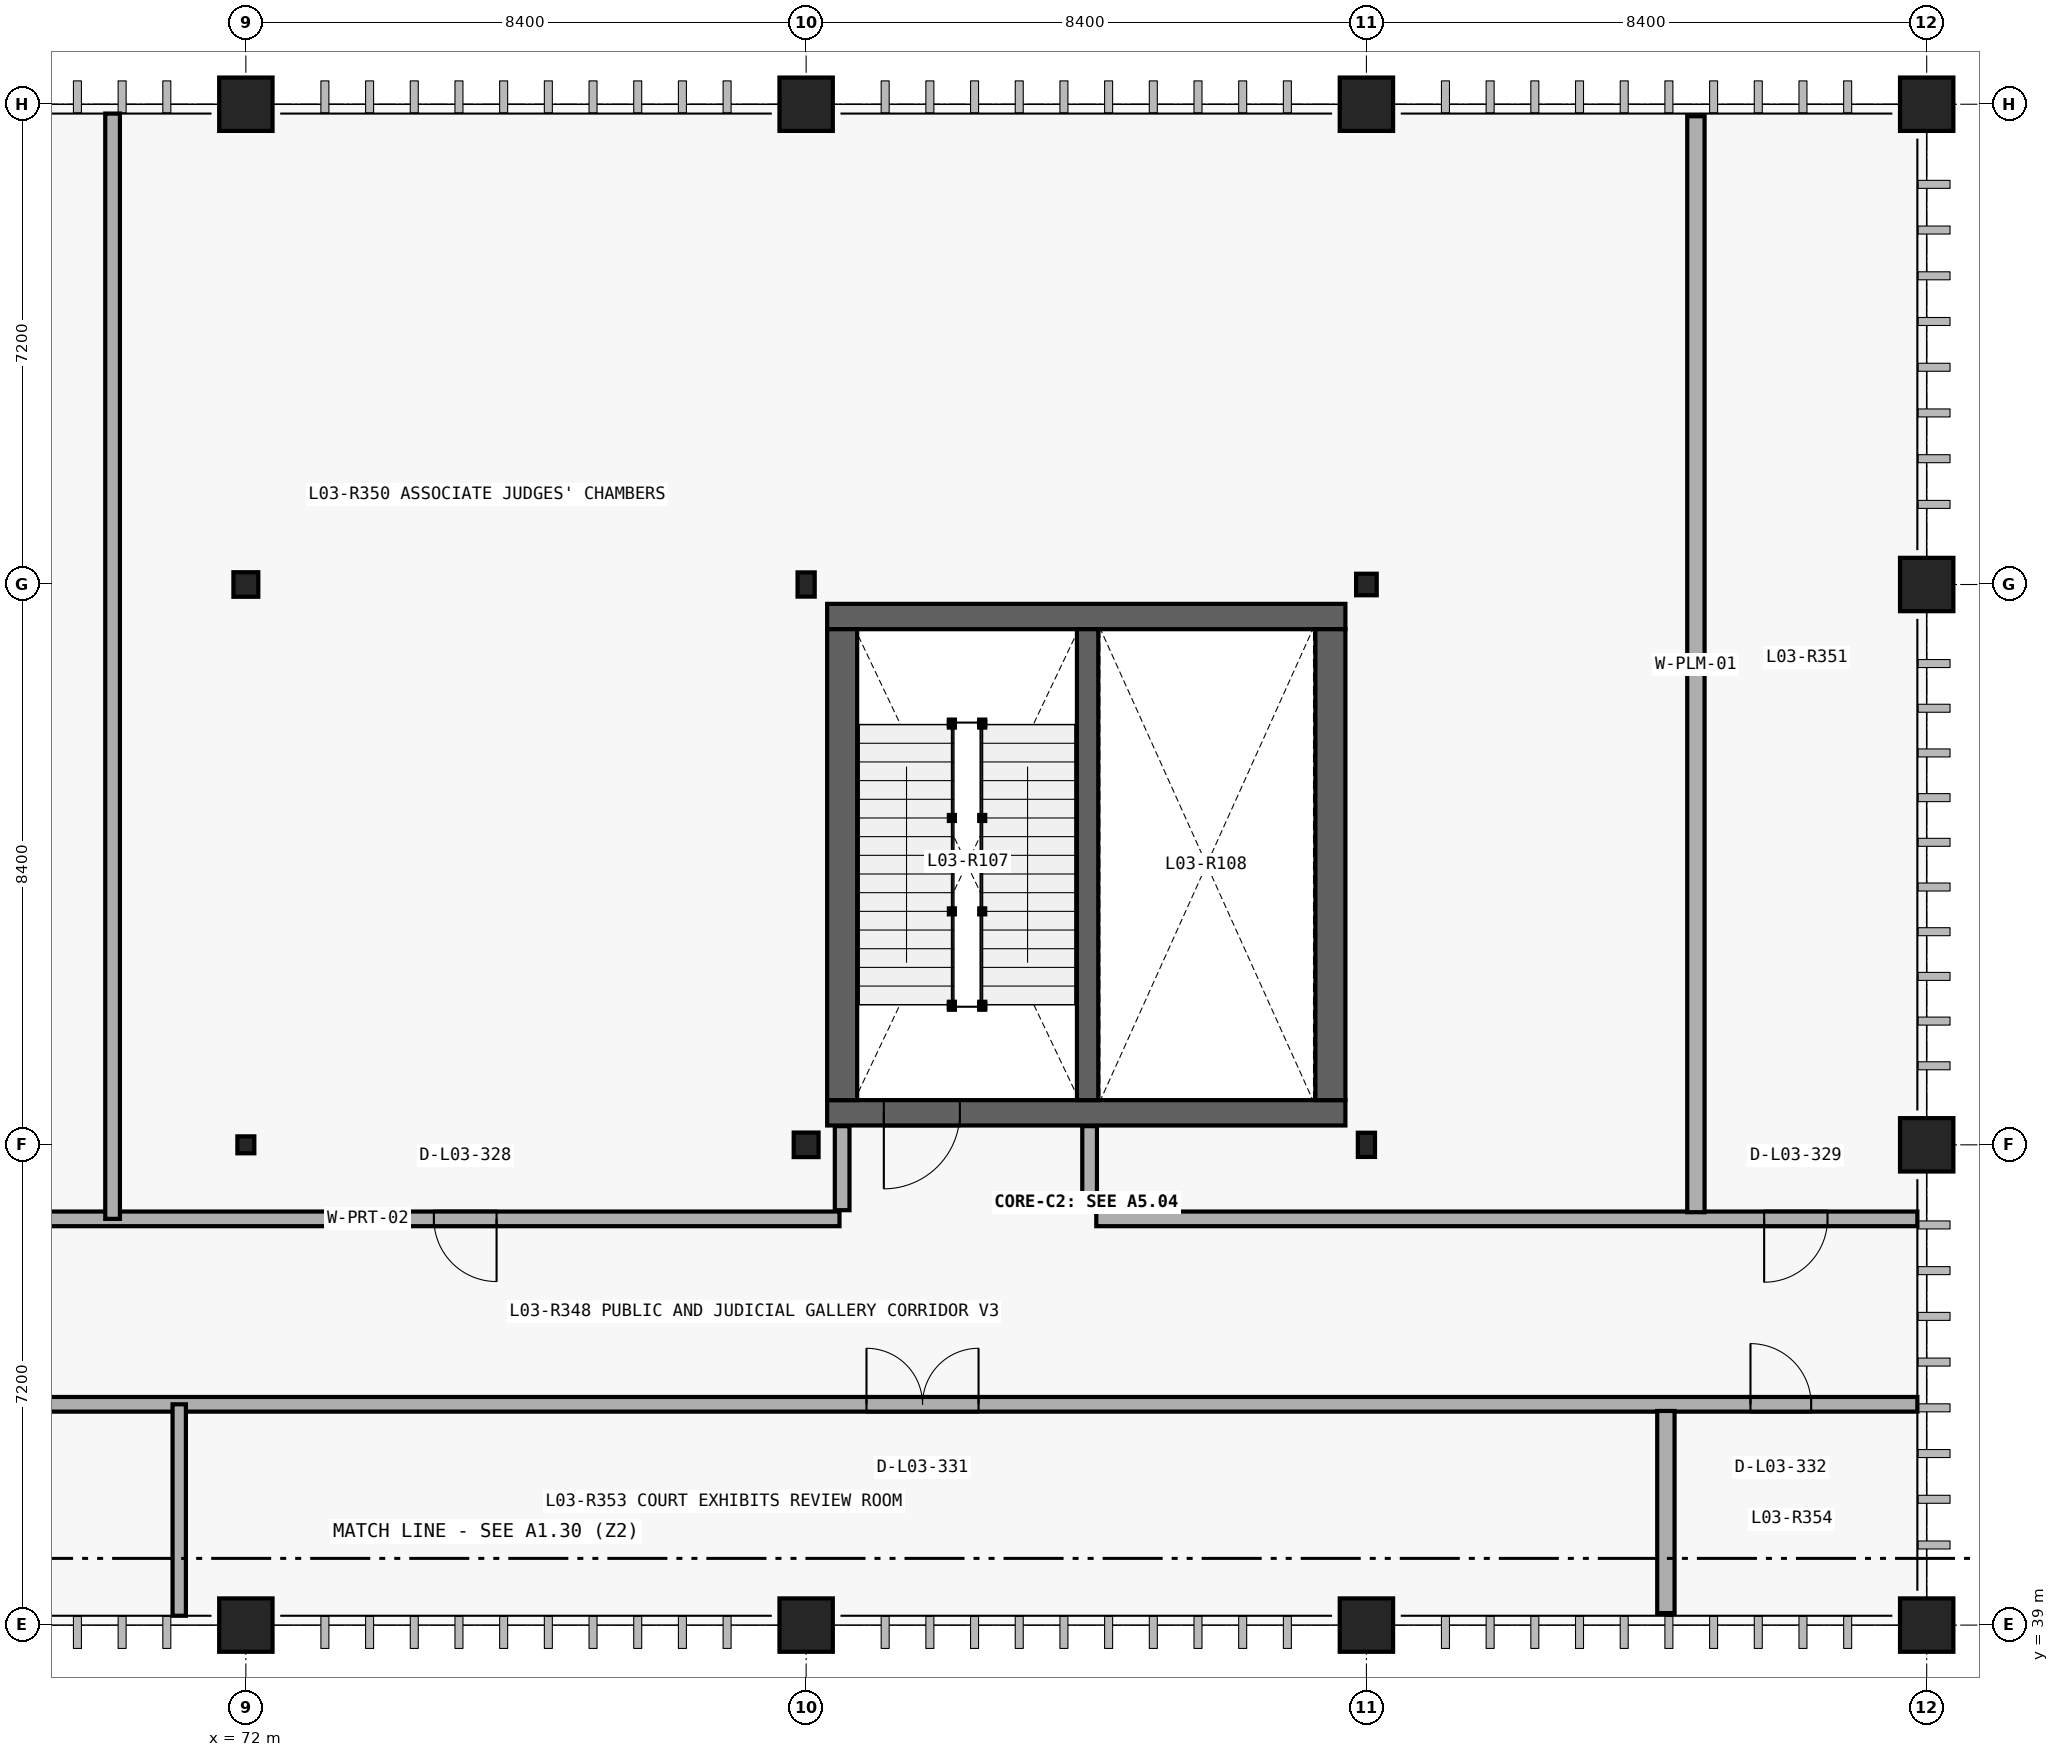
"""IFC4 building model, lengths in metres.
Left out: names, types, materials, properties, quantities, classifications, styles, units other than length and angle.
Written with IfcOpenShell. Run it as: python <this file> out.ifc"""

import sys

from ifc_helpers import new_model, si_unit, direction, frame, frame_2d, origin_with_axes, origin_2d_with_axis, place, context, subcontext, project, spatial, rectangle, hollow_rectangle, circle, i_section, extrude, element, fill, save


model = new_model("IFC4")
c1 = context("Model", 3, precision=1e-05, world=origin_with_axes(), true_north=direction((0.0, 1.0)))
c2 = subcontext(c1, "Body", "Model", "MODEL_VIEW")
j1 = project(units=[si_unit("LENGTHUNIT", "METRE"), si_unit("PLANEANGLEUNIT", "RADIAN")], contexts=[c1])
p1 = place(None, origin_with_axes())
s1 = spatial("IfcSite", under=j1, at=p1, CompositionType="ELEMENT")
p2 = place(p1, origin_with_axes())
s2 = spatial("IfcBuilding", under=s1, at=p2, CompositionType="ELEMENT")
p3 = place(p2, frame((0.0, 0.0, 15.6), z_axis=(0.0, 0.0, 1.0), x_axis=(1.0, 0.0, 0.0)))
s3 = spatial("IfcBuildingStorey", under=s2, at=p3, CompositionType="ELEMENT", Elevation=15.6)
p4 = place(None, frame((80.715, 46.68, 15.6), z_axis=(0.0, 0.0, 1.0), x_axis=(1.0, 0.0, 0.0)))
e1 = element("IfcWall", 1, at=p4, inside=s3, PredefinedType="SHEAR", context=c2, shape_type="SweptSolid", body=[
    extrude(rectangle(XDim=7.77, YDim=0.38, at=frame_2d((3.885, 0.0), x_axis=(1.0, 0.0))), origin_with_axes(), (0.0, 0.0, 1.0), 4.8),
])
p5 = place(None, frame((82.135, 46.68, 15.6), z_axis=(0.0, 0.0, 1.0), x_axis=(1.0, 0.0, 0.0)))
e2 = element("IfcOpeningElement", 2, at=p5, cuts=e1, PredefinedType="OPENING", context=c2, shape_type="SweptSolid", body=[
    extrude(rectangle(XDim=1.14, YDim=2.18, at=frame_2d((0.0, 1.09), x_axis=(1.0, 0.0))), frame((0.0, 0.2, 0.0), z_axis=(0.0, -1.0, 0.0), x_axis=(1.0, 0.0, 0.0)), (0.0, 0.0, 1.0), 0.4),
])
p6 = place(None, frame((88.485, 54.12, 15.6), z_axis=(0.0, 0.0, 1.0), x_axis=(-1.0, 0.0, 0.0)))
e3 = element("IfcWall", 3, at=p6, inside=s3, PredefinedType="SHEAR", context=c2, shape_type="SweptSolid", body=[
    extrude(rectangle(XDim=7.77, YDim=0.38, at=frame_2d((3.885, 0.0), x_axis=(1.0, 0.0))), origin_with_axes(), (0.0, 0.0, 1.0), 4.8),
])
for number, where, z_axis, x_axis in (
    (4, (88.26, 46.87, 15.6), (0.0, 0.0, 1.0), (0.0, 1.0, 0.0)),
    (5, (80.94, 53.93, 15.6), (0.0, 0.0, 1.0), (0.0, -1.0, 0.0)),
):
    element("IfcWall", number, at=place(None, frame(where, z_axis=z_axis, x_axis=x_axis)), inside=s3, PredefinedType="SHEAR", context=c2, shape_type="SweptSolid", body=[
        extrude(rectangle(XDim=7.06, YDim=0.45, at=frame_2d((3.53, 0.0), x_axis=(1.0, 0.0))), origin_with_axes(), (0.0, 0.0, 1.0), 4.8),
    ])
p7 = place(None, frame((84.62, 46.87, 15.6), z_axis=(0.0, 0.0, 1.0), x_axis=(0.0, 1.0, 0.0)))
e6 = element("IfcWall", 6, at=p7, inside=s3, PredefinedType="SHEAR", context=c2, shape_type="SweptSolid", body=[
    extrude(rectangle(XDim=7.06, YDim=0.32, at=frame_2d((3.53, 0.0), x_axis=(1.0, 0.0))), origin_with_axes(), (0.0, 0.0, 1.0), 4.8),
])
for number, where, z_axis, x_axis in (
    (7, (80.94, 45.22, 15.6), (0.0, 0.0, 1.0), (0.0, 1.0, 0.0)),
    (8, (84.65, 45.22, 15.6), (0.0, 0.0, 1.0), (0.0, 1.0, 0.0)),
):
    element("IfcWall", number, at=place(None, frame(where, z_axis=z_axis, x_axis=x_axis)), inside=s3, PredefinedType="PARTITIONING", context=c2, shape_type="SweptSolid", body=[
        extrude(rectangle(XDim=1.26, YDim=0.22, at=frame_2d((0.63, 0.0), x_axis=(1.0, 0.0))), origin_with_axes(), (0.0, 0.0, 1.0), 4.48),
    ])
p8 = place(None, frame((66.755, 45.09, 15.6), z_axis=(0.0, 0.0, 1.0), x_axis=(1.0, 0.0, 0.0)))
e9 = element("IfcWall", 9, at=p8, inside=s3, PredefinedType="PARTITIONING", context=c2, shape_type="SweptSolid", body=[
    extrude(rectangle(XDim=14.145, YDim=0.22, at=frame_2d((7.072, 0.0), x_axis=(1.0, 0.0))), origin_with_axes(), (0.0, 0.0, 1.0), 4.48),
])
p9 = place(None, frame((75.289, 45.09, 15.6), z_axis=(0.0, 0.0, 1.0), x_axis=(1.0, 0.0, 0.0)))
e10 = element("IfcOpeningElement", 10, at=p9, cuts=e9, PredefinedType="OPENING", context=c2, shape_type="SweptSolid", body=[
    extrude(rectangle(XDim=0.94, YDim=2.3, at=frame_2d((0.0, 1.15), x_axis=(1.0, 0.0))), frame((0.0, 0.12, 0.0), z_axis=(0.0, -1.0, 0.0), x_axis=(1.0, 0.0, 0.0)), (0.0, 0.0, 1.0), 0.24),
])
p10 = place(None, frame((84.75, 45.09, 15.6), z_axis=(0.0, 0.0, 1.0), x_axis=(1.0, 0.0, 0.0)))
e11 = element("IfcWall", 11, at=p10, inside=s3, PredefinedType="PARTITIONING", context=c2, shape_type="SweptSolid", body=[
    extrude(rectangle(XDim=12.31, YDim=0.22, at=frame_2d((6.155, 0.0), x_axis=(1.0, 0.0))), origin_with_axes(), (0.0, 0.0, 1.0), 4.48),
])
p11 = place(None, frame((95.238, 45.09, 15.6), z_axis=(0.0, 0.0, 1.0), x_axis=(1.0, 0.0, 0.0)))
e12 = element("IfcOpeningElement", 12, at=p11, cuts=e11, PredefinedType="OPENING", context=c2, shape_type="SweptSolid", body=[
    extrude(rectangle(XDim=0.95, YDim=2.1, at=frame_2d((0.0, 1.05), x_axis=(1.0, 0.0))), frame((0.0, 0.12, 0.0), z_axis=(0.0, -1.0, 0.0), x_axis=(1.0, 0.0, 0.0)), (0.0, 0.0, 1.0), 0.24),
])
p12 = place(None, frame((46.956, 42.31, 15.6), z_axis=(0.0, 0.0, 1.0), x_axis=(1.0, 0.0, 0.0)))
e13 = element("IfcWall", 13, at=p12, inside=s3, PredefinedType="PARTITIONING", context=c2, shape_type="SweptSolid", body=[
    extrude(rectangle(XDim=50.104, YDim=0.22, at=frame_2d((25.052, 0.0), x_axis=(1.0, 0.0))), origin_with_axes(), (0.0, 0.0, 1.0), 4.48),
])
p13 = place(None, frame((59.14, 42.31, 15.6), z_axis=(0.0, 0.0, 1.0), x_axis=(1.0, 0.0, 0.0)))
e14 = element("IfcOpeningElement", 14, at=p13, cuts=e13, PredefinedType="OPENING", context=c2, shape_type="SweptSolid", body=[
    extrude(rectangle(XDim=0.92, YDim=2.14, at=frame_2d((0.0, 1.07), x_axis=(1.0, 0.0))), frame((0.0, 0.12, 0.0), z_axis=(0.0, -1.0, 0.0), x_axis=(1.0, 0.0, 0.0)), (0.0, 0.0, 1.0), 0.24),
])
p14 = place(None, frame((82.145, 42.31, 15.6), z_axis=(0.0, 0.0, 1.0), x_axis=(1.0, 0.0, 0.0)))
e15 = element("IfcOpeningElement", 15, at=p14, cuts=e13, PredefinedType="OPENING", context=c2, shape_type="SweptSolid", body=[
    extrude(rectangle(XDim=1.68, YDim=2.22, at=frame_2d((0.0, 1.11), x_axis=(1.0, 0.0))), frame((0.0, 0.12, 0.0), z_axis=(0.0, -1.0, 0.0), x_axis=(1.0, 0.0, 0.0)), (0.0, 0.0, 1.0), 0.24),
])
p15 = place(None, frame((95.013, 42.31, 15.6), z_axis=(0.0, 0.0, 1.0), x_axis=(1.0, 0.0, 0.0)))
e16 = element("IfcOpeningElement", 16, at=p15, cuts=e13, PredefinedType="OPENING", context=c2, shape_type="SweptSolid", body=[
    extrude(rectangle(XDim=0.91, YDim=2.12, at=frame_2d((0.0, 1.06), x_axis=(1.0, 0.0))), frame((0.0, 0.12, 0.0), z_axis=(0.0, -1.0, 0.0), x_axis=(1.0, 0.0, 0.0)), (0.0, 0.0, 1.0), 0.24),
])
p16 = place(None, frame((93.74, 45.19, 15.6), z_axis=(0.0, 0.0, 1.0), x_axis=(0.0, 1.0, 0.0)))
e17 = element("IfcWall", 17, at=p16, inside=s3, PredefinedType="PLUMBINGWALL", context=c2, shape_type="SweptSolid", body=[
    extrude(rectangle(XDim=16.43, YDim=0.26, at=frame_2d((8.215, 0.0), x_axis=(1.0, 0.0))), origin_with_axes(), (0.0, 0.0, 1.0), 4.48),
])
p17 = place(None, frame((93.29, 39.18, 15.6), z_axis=(0.0, 0.0, 1.0), x_axis=(0.0, 1.0, 0.0)))
e18 = element("IfcWall", 18, at=p17, inside=s3, PredefinedType="PLUMBINGWALL", context=c2, shape_type="SweptSolid", body=[
    extrude(rectangle(XDim=3.03, YDim=0.26, at=frame_2d((1.515, 0.0), x_axis=(1.0, 0.0))), origin_with_axes(), (0.0, 0.0, 1.0), 4.48),
])
p18 = place(None, frame((70.002, 45.09, 15.6), z_axis=(0.0, 0.0, 1.0), x_axis=(0.0, 1.0, 0.0)))
e19 = element("IfcWall", 19, at=p18, inside=s3, PredefinedType="PARTITIONING", context=c2, shape_type="SweptSolid", body=[
    extrude(rectangle(XDim=16.57, YDim=0.22, at=frame_2d((8.285, 0.0), x_axis=(1.0, 0.0))), origin_with_axes(), (0.0, 0.0, 1.0), 4.48),
])
p19 = place(None, frame((71.001, 39.14, 15.6), z_axis=(0.0, 0.0, 1.0), x_axis=(0.0, 1.0, 0.0)))
e20 = element("IfcWall", 20, at=p19, inside=s3, PredefinedType="PARTITIONING", context=c2, shape_type="SweptSolid", body=[
    extrude(rectangle(XDim=3.17, YDim=0.2, at=frame_2d((1.585, 0.0), x_axis=(1.0, 0.0))), origin_with_axes(), (0.0, 0.0, 1.0), 4.48),
])
p20 = place(None, frame((72.0, 39.0, 15.6), z_axis=(0.0, 0.0, 1.0), x_axis=(1.0, 0.0, 0.0)))
e21 = element("IfcColumn", 21, at=p20, inside=s3, PredefinedType="COLUMN", context=c2, shape_type="SweptSolid", body=[
    extrude(circle(Radius=0.4, at=origin_2d_with_axis()), origin_with_axes(), (0.0, 0.0, 1.0), 4.8),
])
p21 = place(None, frame((72.0, 46.2, 15.6), z_axis=(0.0, 0.0, 1.0), x_axis=(1.0, 0.0, 0.0)))
e22 = element("IfcColumn", 22, at=p21, inside=s3, PredefinedType="COLUMN", context=c2, shape_type="SweptSolid", body=[
    extrude(hollow_rectangle(XDim=0.254, YDim=0.254, WallThickness=0.013, InnerFilletRadius=0.025, OuterFilletRadius=0.013, at=origin_2d_with_axis()), origin_with_axes(), (0.0, 0.0, 1.0), 4.8),
])
p22 = place(None, frame((72.0, 54.6, 15.6), z_axis=(0.0, 0.0, 1.0), x_axis=(1.0, 0.0, 0.0)))
e23 = element("IfcColumn", 23, at=p22, inside=s3, PredefinedType="COLUMN", context=c2, shape_type="SweptSolid", body=[
    extrude(i_section(OverallWidth=0.373, OverallDepth=0.368, WebThickness=0.015, FlangeThickness=0.024, at=origin_2d_with_axis()), origin_with_axes(), (0.0, 0.0, 1.0), 4.8),
])
for number, where, z_axis, x_axis in (
    (24, (72.0, 61.8, 15.6), (0.0, 0.0, 1.0), (1.0, 0.0, 0.0)),
    (25, (80.4, 39.0, 15.6), (0.0, 0.0, 1.0), (1.0, 0.0, 0.0)),
):
    element("IfcColumn", number, at=place(None, frame(where, z_axis=z_axis, x_axis=x_axis)), inside=s3, PredefinedType="COLUMN", context=c2, shape_type="SweptSolid", body=[
        extrude(circle(Radius=0.4, at=origin_2d_with_axis()), origin_with_axes(), (0.0, 0.0, 1.0), 4.8),
    ])
p23 = place(None, frame((80.4, 46.2, 15.6), z_axis=(0.0, 0.0, 1.0), x_axis=(1.0, 0.0, 0.0)))
e26 = element("IfcColumn", 26, at=p23, inside=s3, PredefinedType="COLUMN", context=c2, shape_type="SweptSolid", body=[
    extrude(i_section(OverallWidth=0.373, OverallDepth=0.368, WebThickness=0.015, FlangeThickness=0.024, at=origin_2d_with_axis()), origin_with_axes(), (0.0, 0.0, 1.0), 4.8),
])
p24 = place(None, frame((80.4, 54.6, 15.6), z_axis=(0.0, 0.0, 1.0), x_axis=(1.0, 0.0, 0.0)))
e27 = element("IfcColumn", 27, at=p24, inside=s3, PredefinedType="COLUMN", context=c2, shape_type="SweptSolid", body=[
    extrude(i_section(OverallWidth=0.257, OverallDepth=0.363, WebThickness=0.013, FlangeThickness=0.022, at=origin_2d_with_axis()), origin_with_axes(), (0.0, 0.0, 1.0), 4.8),
])
for number, where, z_axis, x_axis in (
    (28, (80.4, 61.8, 15.6), (0.0, 0.0, 1.0), (1.0, 0.0, 0.0)),
    (29, (88.8, 39.0, 15.6), (0.0, 0.0, 1.0), (1.0, 0.0, 0.0)),
):
    element("IfcColumn", number, at=place(None, frame(where, z_axis=z_axis, x_axis=x_axis)), inside=s3, PredefinedType="COLUMN", context=c2, shape_type="SweptSolid", body=[
        extrude(circle(Radius=0.4, at=origin_2d_with_axis()), origin_with_axes(), (0.0, 0.0, 1.0), 4.8),
    ])
p25 = place(None, frame((88.8, 46.2, 15.6), z_axis=(0.0, 0.0, 1.0), x_axis=(1.0, 0.0, 0.0)))
e30 = element("IfcColumn", 30, at=p25, inside=s3, PredefinedType="COLUMN", context=c2, shape_type="SweptSolid", body=[
    extrude(i_section(OverallWidth=0.257, OverallDepth=0.363, WebThickness=0.013, FlangeThickness=0.022, at=origin_2d_with_axis()), origin_with_axes(), (0.0, 0.0, 1.0), 4.8),
])
p26 = place(None, frame((88.8, 54.6, 15.6), z_axis=(0.0, 0.0, 1.0), x_axis=(1.0, 0.0, 0.0)))
e31 = element("IfcColumn", 31, at=p26, inside=s3, PredefinedType="COLUMN", context=c2, shape_type="SweptSolid", body=[
    extrude(i_section(OverallWidth=0.309, OverallDepth=0.323, WebThickness=0.014, FlangeThickness=0.023, at=origin_2d_with_axis()), origin_with_axes(), (0.0, 0.0, 1.0), 4.8),
])
for number, where, z_axis, x_axis in (
    (32, (88.8, 61.8, 15.6), (0.0, 0.0, 1.0), (1.0, 0.0, 0.0)),
    (33, (97.2, 39.0, 15.6), (0.0, 0.0, 1.0), (1.0, 0.0, 0.0)),
    (34, (97.2, 46.2, 15.6), (0.0, 0.0, 1.0), (1.0, 0.0, 0.0)),
    (35, (97.2, 54.6, 15.6), (0.0, 0.0, 1.0), (1.0, 0.0, 0.0)),
    (36, (97.2, 61.8, 15.6), (0.0, 0.0, 1.0), (1.0, 0.0, 0.0)),
):
    element("IfcColumn", number, at=place(None, frame(where, z_axis=z_axis, x_axis=x_axis)), inside=s3, PredefinedType="COLUMN", context=c2, shape_type="SweptSolid", body=[
        extrude(circle(Radius=0.4, at=origin_2d_with_axis()), origin_with_axes(), (0.0, 0.0, 1.0), 4.8),
    ])
p27 = place(None, frame((82.135, 46.68, 15.6), z_axis=(0.0, 0.0, 1.0), x_axis=(-1.0, 0.0, 0.0)))
e37 = element("IfcDoor", 37, at=p27, inside=s3, OperationType="SINGLE_SWING_LEFT", PredefinedType="DOOR", context=c2, shape_type="SweptSolid", body=[
    extrude(rectangle(XDim=1.14, YDim=2.18, at=frame_2d((0.0, 1.09), x_axis=(1.0, 0.0))), frame((0.0, 0.04, 0.0), z_axis=(0.0, -1.0, 0.0), x_axis=(1.0, 0.0, 0.0)), (0.0, 0.0, 1.0), 0.08),
])
fill(e2, e37)
p28 = place(None, frame((75.289, 45.09, 15.6), z_axis=(0.0, 0.0, 1.0), x_axis=(-1.0, 0.0, 0.0)))
e38 = element("IfcDoor", 38, at=p28, inside=s3, OperationType="SINGLE_SWING_RIGHT", PredefinedType="DOOR", context=c2, shape_type="SweptSolid", body=[
    extrude(rectangle(XDim=0.94, YDim=2.3, at=frame_2d((0.0, 1.15), x_axis=(1.0, 0.0))), frame((0.0, 0.04, 0.0), z_axis=(0.0, -1.0, 0.0), x_axis=(1.0, 0.0, 0.0)), (0.0, 0.0, 1.0), 0.08),
])
fill(e10, e38)
p29 = place(None, frame((95.238, 45.09, 15.6), z_axis=(0.0, 0.0, 1.0), x_axis=(-1.0, 0.0, 0.0)))
e39 = element("IfcDoor", 39, at=p29, inside=s3, OperationType="SINGLE_SWING_LEFT", PredefinedType="DOOR", context=c2, shape_type="SweptSolid", body=[
    extrude(rectangle(XDim=0.95, YDim=2.1, at=frame_2d((0.0, 1.05), x_axis=(1.0, 0.0))), frame((0.0, 0.04, 0.0), z_axis=(0.0, -1.0, 0.0), x_axis=(1.0, 0.0, 0.0)), (0.0, 0.0, 1.0), 0.08),
])
fill(e12, e39)
p30 = place(None, frame((82.145, 42.31, 15.6), z_axis=(0.0, 0.0, 1.0), x_axis=(1.0, 0.0, 0.0)))
e40 = element("IfcDoor", 40, at=p30, inside=s3, OperationType="DOUBLE_DOOR_SINGLE_SWING", PredefinedType="DOOR", context=c2, shape_type="SweptSolid", body=[
    extrude(rectangle(XDim=1.68, YDim=2.22, at=frame_2d((0.0, 1.11), x_axis=(1.0, 0.0))), frame((0.0, 0.04, 0.0), z_axis=(0.0, -1.0, 0.0), x_axis=(1.0, 0.0, 0.0)), (0.0, 0.0, 1.0), 0.08),
])
fill(e15, e40)
p31 = place(None, frame((95.013, 42.31, 15.6), z_axis=(0.0, 0.0, 1.0), x_axis=(1.0, 0.0, 0.0)))
e41 = element("IfcDoor", 41, at=p31, inside=s3, OperationType="SINGLE_SWING_LEFT", PredefinedType="DOOR", context=c2, shape_type="SweptSolid", body=[
    extrude(rectangle(XDim=0.91, YDim=2.12, at=frame_2d((0.0, 1.06), x_axis=(1.0, 0.0))), frame((0.0, 0.04, 0.0), z_axis=(0.0, -1.0, 0.0), x_axis=(1.0, 0.0, 0.0)), (0.0, 0.0, 1.0), 0.08),
])
fill(e16, e41)
save(model, sys.argv[1])
